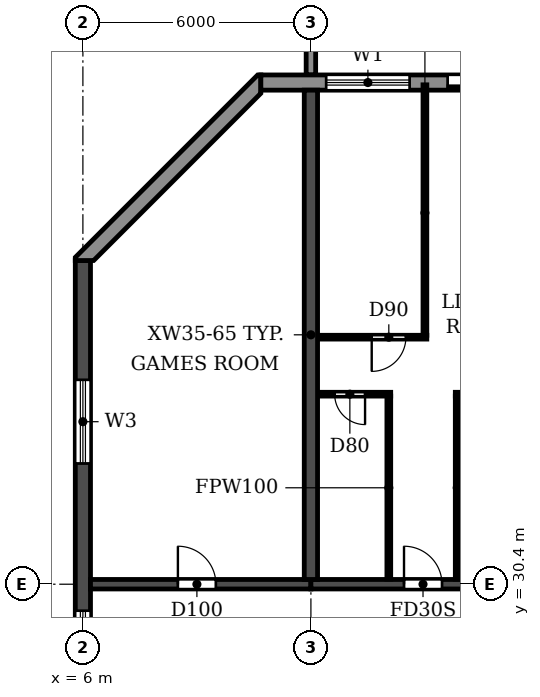
"""IFC4 building model, lengths in metres.
Left out: names, types, materials, properties, quantities, classifications, styles, units other than length and angle.
Written with IfcOpenShell. Run it as: python <this file> out.ifc"""

import sys

from ifc_helpers import new_model, si_unit, direction, frame, frame_2d, origin, place, context, subcontext, project, spatial, polyline, rectangle, outline, extrude, source, transform, mapped, element, fill, save


model = new_model("IFC4")
c1 = context("Model", 3, precision=1e-05, world=origin(), true_north=direction((0.0, 1.0)))
c2 = subcontext(c1, "Body", "Model", "MODEL_VIEW")
j1 = project(units=[si_unit("LENGTHUNIT", "METRE"), si_unit("PLANEANGLEUNIT", "RADIAN")], contexts=[c1])
p1 = place(None, origin())
s1 = spatial("IfcSite", under=j1, at=p1, CompositionType="ELEMENT")
p2 = place(p1, origin())
s2 = spatial("IfcBuilding", under=s1, at=p2, CompositionType="ELEMENT")
p3 = place(p2, frame((0.0, 0.0, 76.2)))
s3 = spatial("IfcBuildingStorey", under=s2, at=p3, CompositionType="ELEMENT", Elevation=76.2)
p4 = place(p3, frame((12.0, 30.525, 0.0), z_axis=(0.0, 0.0, 1.0), x_axis=(0.0, 1.0, 0.0)))
e1 = element("IfcWall", 1, at=p4, inside=s3, PredefinedType="SHEAR", context=c2, shape_type="SweptSolid", body=[
    extrude(rectangle(XDim=12.875, YDim=0.35, at=frame_2d((6.438, 0.0))), origin(), (0.0, 0.0, 1.0), 3.06),
])
p5 = place(p3, frame((6.0, 4.683, 0.0), z_axis=(0.0, 0.0, 1.0), x_axis=(0.0, 1.0, 0.0)))
e2 = element("IfcWall", 2, at=p5, inside=s3, PredefinedType="SHEAR", context=c2, shape_type="SweptSolid", body=[
    extrude(rectangle(XDim=34.234, YDim=0.4, at=frame_2d((17.117, 0.0))), origin(), (0.0, 0.0, 1.0), 3.06),
])
p6 = place(p5, frame((23.817, 0.0, 0.9)))
e3 = element("IfcOpeningElement", 3, at=p6, cuts=e2, PredefinedType="OPENING", context=c2, shape_type="SweptSolid", body=[
    extrude(rectangle(XDim=1.2, YDim=1.5, at=frame_2d((0.6, 0.75))), frame((0.0, 0.21, 0.0), z_axis=(0.0, -1.0, 0.0), x_axis=(1.0, 0.0, 0.0)), (0.0, 0.0, 1.0), 0.42),
])
p7 = place(p5, frame((8.017, 0.0, 0.9)))
e4 = element("IfcOpeningElement", 4, at=p7, cuts=e2, PredefinedType="OPENING", context=c2, shape_type="SweptSolid", body=[
    extrude(rectangle(XDim=1.2, YDim=1.5, at=frame_2d((0.6, 0.75))), frame((0.0, 0.21, 0.0), z_axis=(0.0, -1.0, 0.0), x_axis=(1.0, 0.0, 0.0)), (0.0, 0.0, 1.0), 0.42),
])
p8 = place(p5, frame((15.917, 0.0, 0.9)))
e5 = element("IfcOpeningElement", 5, at=p8, cuts=e2, PredefinedType="OPENING", context=c2, shape_type="SweptSolid", body=[
    extrude(rectangle(XDim=1.2, YDim=1.5, at=frame_2d((0.6, 0.75))), frame((0.0, 0.21, 0.0), z_axis=(0.0, -1.0, 0.0), x_axis=(1.0, 0.0, 0.0)), (0.0, 0.0, 1.0), 0.42),
])
p9 = place(p5, frame((28.894, 0.0, 0.6)))
e6 = element("IfcOpeningElement", 6, at=p9, cuts=e2, PredefinedType="OPENING", context=c2, shape_type="SweptSolid", body=[
    extrude(rectangle(XDim=2.2, YDim=1.8, at=frame_2d((1.1, 0.9))), frame((0.0, 0.21, 0.0), z_axis=(0.0, -1.0, 0.0), x_axis=(1.0, 0.0, 0.0)), (0.0, 0.0, 1.0), 0.42),
])
p10 = place(p5, frame((2.541, 0.0, 0.6)))
e7 = element("IfcOpeningElement", 7, at=p10, cuts=e2, PredefinedType="OPENING", context=c2, shape_type="SweptSolid", body=[
    extrude(rectangle(XDim=2.2, YDim=1.8, at=frame_2d((1.1, 0.9))), frame((0.0, 0.21, 0.0), z_axis=(0.0, -1.0, 0.0), x_axis=(1.0, 0.0, 0.0)), (0.0, 0.0, 1.0), 0.42),
])
p11 = place(p3, frame((6.2, 30.4, 0.0), z_axis=(0.0, 0.0, 1.0), x_axis=(1.0, 0.0, 0.0)))
e8 = element("IfcWall", 8, at=p11, inside=s3, PredefinedType="SHEAR", context=c2, shape_type="SweptSolid", body=[
    extrude(rectangle(XDim=5.8, YDim=0.25, at=frame_2d((2.9, 0.0))), origin(), (0.0, 0.0, 1.0), 2.46),
])
p12 = place(p11, frame((2.3, 0.0, 0.0)))
e9 = element("IfcOpeningElement", 9, at=p12, cuts=e8, PredefinedType="OPENING", context=c2, shape_type="SweptSolid", body=[
    extrude(rectangle(XDim=1.0, YDim=2.1, at=frame_2d((0.5, 1.05))), frame((0.0, 0.135, 0.0), z_axis=(0.0, -1.0, 0.0), x_axis=(1.0, 0.0, 0.0)), (0.0, 0.0, 1.0), 0.27),
])
p13 = place(p3, frame((12.0, 30.4, 0.0), z_axis=(0.0, 0.0, 1.0), x_axis=(1.0, 0.0, 0.0)))
e10 = element("IfcWall", 10, at=p13, inside=s3, PredefinedType="SHEAR", context=c2, shape_type="SweptSolid", body=[
    extrude(rectangle(XDim=6.0, YDim=0.25, at=frame_2d((3.0, 0.0))), origin(), (0.0, 0.0, 1.0), 2.46),
])
p14 = place(p13, frame((2.45, 0.0, 0.0)))
e11 = element("IfcOpeningElement", 11, at=p14, cuts=e10, PredefinedType="OPENING", context=c2, shape_type="SweptSolid", body=[
    extrude(rectangle(XDim=1.0, YDim=2.1, at=frame_2d((0.5, 1.05))), frame((0.0, 0.135, 0.0), z_axis=(0.0, -1.0, 0.0), x_axis=(1.0, 0.0, 0.0)), (0.0, 0.0, 1.0), 0.27),
])
p15 = place(p3, frame((91.317, 43.6, 0.0), z_axis=(0.0, 0.0, 1.0), x_axis=(-1.0, 0.0, 0.0)))
e12 = element("IfcWall", 12, at=p15, inside=s3, PredefinedType="STANDARD", context=c2, shape_type="SweptSolid", body=[
    extrude(rectangle(XDim=80.634, YDim=0.4, at=frame_2d((40.317, 0.0))), origin(), (0.0, 0.0, 1.0), 3.06),
])
p16 = place(p15, frame((76.717, 0.0, 0.9)))
e13 = element("IfcOpeningElement", 13, at=p16, cuts=e12, PredefinedType="OPENING", context=c2, shape_type="SweptSolid", body=[
    extrude(rectangle(XDim=2.2, YDim=1.5, at=frame_2d((1.1, 0.75))), frame((0.0, 0.21, 0.0), z_axis=(0.0, -1.0, 0.0), x_axis=(1.0, 0.0, 0.0)), (0.0, 0.0, 1.0), 0.42),
])
p17 = place(p15, frame((73.917, 0.0, 0.0)))
e14 = element("IfcOpeningElement", 14, at=p17, cuts=e12, PredefinedType="OPENING", context=c2, shape_type="SweptSolid", body=[
    extrude(rectangle(XDim=1.8, YDim=2.4, at=frame_2d((0.9, 1.2))), frame((0.0, 0.21, 0.0), z_axis=(0.0, -1.0, 0.0), x_axis=(1.0, 0.0, 0.0)), (0.0, 0.0, 1.0), 0.42),
])
p18 = place(p15, frame((70.917, 0.0, 0.0)))
e15 = element("IfcOpeningElement", 15, at=p18, cuts=e12, PredefinedType="OPENING", context=c2, shape_type="SweptSolid", body=[
    extrude(rectangle(XDim=1.8, YDim=2.4, at=frame_2d((0.9, 1.2))), frame((0.0, 0.21, 0.0), z_axis=(0.0, -1.0, 0.0), x_axis=(1.0, 0.0, 0.0)), (0.0, 0.0, 1.0), 0.42),
])
p19 = place(p15, frame((67.717, 0.0, 0.9)))
e16 = element("IfcOpeningElement", 16, at=p19, cuts=e12, PredefinedType="OPENING", context=c2, shape_type="SweptSolid", body=[
    extrude(rectangle(XDim=2.2, YDim=1.5, at=frame_2d((1.1, 0.75))), frame((0.0, 0.21, 0.0), z_axis=(0.0, -1.0, 0.0), x_axis=(1.0, 0.0, 0.0)), (0.0, 0.0, 1.0), 0.42),
])
p20 = place(p15, frame((64.717, 0.0, 0.9)))
e17 = element("IfcOpeningElement", 17, at=p20, cuts=e12, PredefinedType="OPENING", context=c2, shape_type="SweptSolid", body=[
    extrude(rectangle(XDim=2.2, YDim=1.5, at=frame_2d((1.1, 0.75))), frame((0.0, 0.21, 0.0), z_axis=(0.0, -1.0, 0.0), x_axis=(1.0, 0.0, 0.0)), (0.0, 0.0, 1.0), 0.42),
])
p21 = place(p15, frame((61.917, 0.0, 0.0)))
e18 = element("IfcOpeningElement", 18, at=p21, cuts=e12, PredefinedType="OPENING", context=c2, shape_type="SweptSolid", body=[
    extrude(rectangle(XDim=1.8, YDim=2.4, at=frame_2d((0.9, 1.2))), frame((0.0, 0.21, 0.0), z_axis=(0.0, -1.0, 0.0), x_axis=(1.0, 0.0, 0.0)), (0.0, 0.0, 1.0), 0.42),
])
p22 = place(p15, frame((58.717, 0.0, 0.9)))
e19 = element("IfcOpeningElement", 19, at=p22, cuts=e12, PredefinedType="OPENING", context=c2, shape_type="SweptSolid", body=[
    extrude(rectangle(XDim=2.2, YDim=1.5, at=frame_2d((1.1, 0.75))), frame((0.0, 0.21, 0.0), z_axis=(0.0, -1.0, 0.0), x_axis=(1.0, 0.0, 0.0)), (0.0, 0.0, 1.0), 0.42),
])
p23 = place(p15, frame((55.917, 0.0, 0.0)))
e20 = element("IfcOpeningElement", 20, at=p23, cuts=e12, PredefinedType="OPENING", context=c2, shape_type="SweptSolid", body=[
    extrude(rectangle(XDim=1.8, YDim=2.4, at=frame_2d((0.9, 1.2))), frame((0.0, 0.21, 0.0), z_axis=(0.0, -1.0, 0.0), x_axis=(1.0, 0.0, 0.0)), (0.0, 0.0, 1.0), 0.42),
])
p24 = place(p15, frame((52.717, 0.0, 0.9)))
e21 = element("IfcOpeningElement", 21, at=p24, cuts=e12, PredefinedType="OPENING", context=c2, shape_type="SweptSolid", body=[
    extrude(rectangle(XDim=2.2, YDim=1.5, at=frame_2d((1.1, 0.75))), frame((0.0, 0.21, 0.0), z_axis=(0.0, -1.0, 0.0), x_axis=(1.0, 0.0, 0.0)), (0.0, 0.0, 1.0), 0.42),
])
p25 = place(p15, frame((49.717, 0.0, 0.9)))
e22 = element("IfcOpeningElement", 22, at=p25, cuts=e12, PredefinedType="OPENING", context=c2, shape_type="SweptSolid", body=[
    extrude(rectangle(XDim=2.2, YDim=1.5, at=frame_2d((1.1, 0.75))), frame((0.0, 0.21, 0.0), z_axis=(0.0, -1.0, 0.0), x_axis=(1.0, 0.0, 0.0)), (0.0, 0.0, 1.0), 0.42),
])
p26 = place(p15, frame((46.917, 0.0, 0.0)))
e23 = element("IfcOpeningElement", 23, at=p26, cuts=e12, PredefinedType="OPENING", context=c2, shape_type="SweptSolid", body=[
    extrude(rectangle(XDim=1.8, YDim=2.4, at=frame_2d((0.9, 1.2))), frame((0.0, 0.21, 0.0), z_axis=(0.0, -1.0, 0.0), x_axis=(1.0, 0.0, 0.0)), (0.0, 0.0, 1.0), 0.42),
])
p27 = place(p15, frame((43.717, 0.0, 0.9)))
e24 = element("IfcOpeningElement", 24, at=p27, cuts=e12, PredefinedType="OPENING", context=c2, shape_type="SweptSolid", body=[
    extrude(rectangle(XDim=2.2, YDim=1.5, at=frame_2d((1.1, 0.75))), frame((0.0, 0.21, 0.0), z_axis=(0.0, -1.0, 0.0), x_axis=(1.0, 0.0, 0.0)), (0.0, 0.0, 1.0), 0.42),
])
p28 = place(p15, frame((40.717, 0.0, 0.9)))
e25 = element("IfcOpeningElement", 25, at=p28, cuts=e12, PredefinedType="OPENING", context=c2, shape_type="SweptSolid", body=[
    extrude(rectangle(XDim=2.2, YDim=1.5, at=frame_2d((1.1, 0.75))), frame((0.0, 0.21, 0.0), z_axis=(0.0, -1.0, 0.0), x_axis=(1.0, 0.0, 0.0)), (0.0, 0.0, 1.0), 0.42),
])
p29 = place(p15, frame((37.917, 0.0, 0.0)))
e26 = element("IfcOpeningElement", 26, at=p29, cuts=e12, PredefinedType="OPENING", context=c2, shape_type="SweptSolid", body=[
    extrude(rectangle(XDim=1.8, YDim=2.4, at=frame_2d((0.9, 1.2))), frame((0.0, 0.21, 0.0), z_axis=(0.0, -1.0, 0.0), x_axis=(1.0, 0.0, 0.0)), (0.0, 0.0, 1.0), 0.42),
])
p30 = place(p15, frame((34.717, 0.0, 0.9)))
e27 = element("IfcOpeningElement", 27, at=p30, cuts=e12, PredefinedType="OPENING", context=c2, shape_type="SweptSolid", body=[
    extrude(rectangle(XDim=2.2, YDim=1.5, at=frame_2d((1.1, 0.75))), frame((0.0, 0.21, 0.0), z_axis=(0.0, -1.0, 0.0), x_axis=(1.0, 0.0, 0.0)), (0.0, 0.0, 1.0), 0.42),
])
p31 = place(p15, frame((31.917, 0.0, 0.0)))
e28 = element("IfcOpeningElement", 28, at=p31, cuts=e12, PredefinedType="OPENING", context=c2, shape_type="SweptSolid", body=[
    extrude(rectangle(XDim=1.8, YDim=2.4, at=frame_2d((0.9, 1.2))), frame((0.0, 0.21, 0.0), z_axis=(0.0, -1.0, 0.0), x_axis=(1.0, 0.0, 0.0)), (0.0, 0.0, 1.0), 0.42),
])
p32 = place(p15, frame((28.717, 0.0, 0.9)))
e29 = element("IfcOpeningElement", 29, at=p32, cuts=e12, PredefinedType="OPENING", context=c2, shape_type="SweptSolid", body=[
    extrude(rectangle(XDim=2.2, YDim=1.5, at=frame_2d((1.1, 0.75))), frame((0.0, 0.21, 0.0), z_axis=(0.0, -1.0, 0.0), x_axis=(1.0, 0.0, 0.0)), (0.0, 0.0, 1.0), 0.42),
])
p33 = place(p15, frame((25.717, 0.0, 0.9)))
e30 = element("IfcOpeningElement", 30, at=p33, cuts=e12, PredefinedType="OPENING", context=c2, shape_type="SweptSolid", body=[
    extrude(rectangle(XDim=2.2, YDim=1.5, at=frame_2d((1.1, 0.75))), frame((0.0, 0.21, 0.0), z_axis=(0.0, -1.0, 0.0), x_axis=(1.0, 0.0, 0.0)), (0.0, 0.0, 1.0), 0.42),
])
p34 = place(p15, frame((22.717, 0.0, 0.9)))
e31 = element("IfcOpeningElement", 31, at=p34, cuts=e12, PredefinedType="OPENING", context=c2, shape_type="SweptSolid", body=[
    extrude(rectangle(XDim=2.2, YDim=1.5, at=frame_2d((1.1, 0.75))), frame((0.0, 0.21, 0.0), z_axis=(0.0, -1.0, 0.0), x_axis=(1.0, 0.0, 0.0)), (0.0, 0.0, 1.0), 0.42),
])
p35 = place(p15, frame((19.917, 0.0, 0.0)))
e32 = element("IfcOpeningElement", 32, at=p35, cuts=e12, PredefinedType="OPENING", context=c2, shape_type="SweptSolid", body=[
    extrude(rectangle(XDim=1.8, YDim=2.4, at=frame_2d((0.9, 1.2))), frame((0.0, 0.21, 0.0), z_axis=(0.0, -1.0, 0.0), x_axis=(1.0, 0.0, 0.0)), (0.0, 0.0, 1.0), 0.42),
])
p36 = place(p15, frame((16.717, 0.0, 0.9)))
e33 = element("IfcOpeningElement", 33, at=p36, cuts=e12, PredefinedType="OPENING", context=c2, shape_type="SweptSolid", body=[
    extrude(rectangle(XDim=2.2, YDim=1.5, at=frame_2d((1.1, 0.75))), frame((0.0, 0.21, 0.0), z_axis=(0.0, -1.0, 0.0), x_axis=(1.0, 0.0, 0.0)), (0.0, 0.0, 1.0), 0.42),
])
p37 = place(p15, frame((13.717, 0.0, 0.9)))
e34 = element("IfcOpeningElement", 34, at=p37, cuts=e12, PredefinedType="OPENING", context=c2, shape_type="SweptSolid", body=[
    extrude(rectangle(XDim=2.2, YDim=1.5, at=frame_2d((1.1, 0.75))), frame((0.0, 0.21, 0.0), z_axis=(0.0, -1.0, 0.0), x_axis=(1.0, 0.0, 0.0)), (0.0, 0.0, 1.0), 0.42),
])
p38 = place(p15, frame((10.717, 0.0, 0.9)))
e35 = element("IfcOpeningElement", 35, at=p38, cuts=e12, PredefinedType="OPENING", context=c2, shape_type="SweptSolid", body=[
    extrude(rectangle(XDim=2.2, YDim=1.5, at=frame_2d((1.1, 0.75))), frame((0.0, 0.21, 0.0), z_axis=(0.0, -1.0, 0.0), x_axis=(1.0, 0.0, 0.0)), (0.0, 0.0, 1.0), 0.42),
])
p39 = place(p15, frame((7.917, 0.0, 0.0)))
e36 = element("IfcOpeningElement", 36, at=p39, cuts=e12, PredefinedType="OPENING", context=c2, shape_type="SweptSolid", body=[
    extrude(rectangle(XDim=1.8, YDim=2.4, at=frame_2d((0.9, 1.2))), frame((0.0, 0.21, 0.0), z_axis=(0.0, -1.0, 0.0), x_axis=(1.0, 0.0, 0.0)), (0.0, 0.0, 1.0), 0.42),
])
p40 = place(p15, frame((4.717, 0.0, 0.9)))
e37 = element("IfcOpeningElement", 37, at=p40, cuts=e12, PredefinedType="OPENING", context=c2, shape_type="SweptSolid", body=[
    extrude(rectangle(XDim=2.2, YDim=1.5, at=frame_2d((1.1, 0.75))), frame((0.0, 0.21, 0.0), z_axis=(0.0, -1.0, 0.0), x_axis=(1.0, 0.0, 0.0)), (0.0, 0.0, 1.0), 0.42),
])
p41 = place(p15, frame((1.917, 0.0, 0.0)))
e38 = element("IfcOpeningElement", 38, at=p41, cuts=e12, PredefinedType="OPENING", context=c2, shape_type="SweptSolid", body=[
    extrude(rectangle(XDim=1.8, YDim=2.4, at=frame_2d((0.9, 1.2))), frame((0.0, 0.21, 0.0), z_axis=(0.0, -1.0, 0.0), x_axis=(1.0, 0.0, 0.0)), (0.0, 0.0, 1.0), 0.42),
])
p42 = place(p3, origin())
e39 = element("IfcWall", 39, at=p42, inside=s3, PredefinedType="STANDARD", context=c2, shape_type="SweptSolid", body=[
    extrude(outline(polyline([(10.683, 43.8), (10.6, 43.8), (5.8, 39.0), (5.8, 38.917), (6.283, 38.917), (10.683, 43.317), (10.683, 43.8)])), origin(), (0.0, 0.0, 1.0), 3.06),
])
m1 = source(origin(), c2, "Body", "SweptSolid", [
    extrude(outline(polyline([(0.0, 0.0), (0.25, 0.0), (0.25, 3.1), (0.0, 3.1), (0.0, 0.0)])), origin(), (0.0, 0.0, 1.0), 3.1),
])
p43 = place(p3, frame((11.875, 43.8, 0.0)))
e40 = element("IfcWall", 40, at=p43, inside=s3, PredefinedType="STANDARD", context=c2, shape_type="MappedRepresentation", body=[
    mapped(m1, transform((0.0, 0.0, 0.0))),
])
p44 = place(p3, frame((12.185, 35.4, 0.0), z_axis=(0.0, 0.0, 1.0), x_axis=(1.0, 0.0, 0.0)))
e41 = element("IfcWall", 41, at=p44, inside=s3, PredefinedType="PARTITIONING", context=c2, shape_type="SweptSolid", body=[
    extrude(rectangle(XDim=1.915, YDim=0.1, at=frame_2d((0.958, 0.0))), origin(), (0.0, 0.0, 1.0), 3.06),
])
p45 = place(p44, frame((0.44, 0.0, 0.0)))
e42 = element("IfcOpeningElement", 42, at=p45, cuts=e41, PredefinedType="OPENING", context=c2, shape_type="SweptSolid", body=[
    extrude(rectangle(XDim=0.8, YDim=2.1, at=frame_2d((0.4, 1.05))), frame((0.0, 0.06, 0.0), z_axis=(0.0, -1.0, 0.0), x_axis=(1.0, 0.0, 0.0)), (0.0, 0.0, 1.0), 0.12),
])
p46 = place(p3, frame((15.8, 35.4, 0.0), z_axis=(0.0, 0.0, 1.0), x_axis=(1.0, 0.0, 0.0)))
e43 = element("IfcWall", 43, at=p46, inside=s3, PredefinedType="PARTITIONING", context=c2, shape_type="SweptSolid", body=[
    extrude(rectangle(XDim=2.015, YDim=0.1, at=frame_2d((1.007, 0.0))), origin(), (0.0, 0.0, 1.0), 3.06),
])
p47 = place(p46, frame((0.675, 0.0, 0.0)))
e44 = element("IfcOpeningElement", 44, at=p47, cuts=e43, PredefinedType="OPENING", context=c2, shape_type="SweptSolid", body=[
    extrude(rectangle(XDim=0.9, YDim=2.1, at=frame_2d((0.45, 1.05))), frame((0.0, 0.06, 0.0), z_axis=(0.0, -1.0, 0.0), x_axis=(1.0, 0.0, 0.0)), (0.0, 0.0, 1.0), 0.12),
])
p48 = place(p3, frame((12.185, 36.9, 0.0), z_axis=(0.0, 0.0, 1.0), x_axis=(1.0, 0.0, 0.0)))
e45 = element("IfcWall", 45, at=p48, inside=s3, PredefinedType="PARTITIONING", context=c2, shape_type="SweptSolid", body=[
    extrude(rectangle(XDim=2.865, YDim=0.1, at=frame_2d((1.433, 0.0))), origin(), (0.0, 0.0, 1.0), 3.06),
])
p49 = place(p48, frame((1.415, 0.0, 0.0)))
e46 = element("IfcOpeningElement", 46, at=p49, cuts=e45, PredefinedType="OPENING", context=c2, shape_type="SweptSolid", body=[
    extrude(rectangle(XDim=0.9, YDim=2.1, at=frame_2d((0.45, 1.05))), frame((0.0, 0.06, 0.0), z_axis=(0.0, -1.0, 0.0), x_axis=(1.0, 0.0, 0.0)), (0.0, 0.0, 1.0), 0.12),
])
p50 = place(p3, frame((14.05, 30.535, 0.0), z_axis=(0.0, 0.0, 1.0), x_axis=(0.0, 1.0, 0.0)))
e47 = element("IfcWall", 47, at=p50, inside=s3, PredefinedType="PARTITIONING", context=c2, shape_type="SweptSolid", body=[
    extrude(rectangle(XDim=4.815, YDim=0.1, at=frame_2d((2.408, 0.0))), origin(), (0.0, 0.0, 1.0), 3.06),
])
p51 = place(p3, frame((15.0, 36.95, 0.0), z_axis=(0.0, 0.0, 1.0), x_axis=(0.0, 1.0, 0.0)))
e48 = element("IfcWall", 48, at=p51, inside=s3, PredefinedType="PARTITIONING", context=c2, shape_type="SweptSolid", body=[
    extrude(rectangle(XDim=6.59, YDim=0.1, at=frame_2d((3.295, 0.0))), origin(), (0.0, 0.0, 1.0), 3.06),
])
p52 = place(p3, frame((15.85, 30.535, 0.0), z_axis=(0.0, 0.0, 1.0), x_axis=(0.0, 1.0, 0.0)))
e49 = element("IfcWall", 49, at=p52, inside=s3, PredefinedType="PARTITIONING", context=c2, shape_type="SweptSolid", body=[
    extrude(rectangle(XDim=4.815, YDim=0.1, at=frame_2d((2.408, 0.0))), origin(), (0.0, 0.0, 1.0), 3.06),
])
p53 = place(p16, origin())
e50 = element("IfcWindow", 50, at=p53, inside=s3, PartitioningType="DOUBLE_PANEL_HORIZONTAL", PredefinedType="WINDOW", context=c2, shape_type="SweptSolid", body=[
    extrude(rectangle(XDim=2.2, YDim=1.5, at=frame_2d((1.1, 0.75))), frame((0.0, 0.03, 0.0), z_axis=(0.0, -1.0, 0.0), x_axis=(1.0, 0.0, 0.0)), (0.0, 0.0, 1.0), 0.06),
])
fill(e13, e50)
p54 = place(p17, origin())
e51 = element("IfcDoor", 51, at=p54, inside=s3, OperationType="DOUBLE_DOOR_SLIDING", PredefinedType="DOOR", context=c2, shape_type="SweptSolid", body=[
    extrude(rectangle(XDim=1.8, YDim=2.4, at=frame_2d((0.9, 1.2))), frame((0.0, 0.025, 0.0), z_axis=(0.0, -1.0, 0.0), x_axis=(1.0, 0.0, 0.0)), (0.0, 0.0, 1.0), 0.05),
])
fill(e14, e51)
p55 = place(p6, origin())
e52 = element("IfcWindow", 52, at=p55, inside=s3, PartitioningType="SINGLE_PANEL", PredefinedType="WINDOW", context=c2, shape_type="SweptSolid", body=[
    extrude(rectangle(XDim=1.2, YDim=1.5, at=frame_2d((0.6, 0.75))), frame((0.0, 0.03, 0.0), z_axis=(0.0, -1.0, 0.0), x_axis=(1.0, 0.0, 0.0)), (0.0, 0.0, 1.0), 0.06),
])
fill(e3, e52)
p56 = place(p9, origin())
e53 = element("IfcWindow", 53, at=p56, inside=s3, PartitioningType="DOUBLE_PANEL_HORIZONTAL", PredefinedType="WINDOW", context=c2, shape_type="SweptSolid", body=[
    extrude(rectangle(XDim=2.2, YDim=1.8, at=frame_2d((1.1, 0.9))), frame((0.0, 0.03, 0.0), z_axis=(0.0, -1.0, 0.0), x_axis=(1.0, 0.0, 0.0)), (0.0, 0.0, 1.0), 0.06),
])
fill(e6, e53)
p57 = place(p12, origin())
e54 = element("IfcDoor", 54, at=p57, inside=s3, OperationType="SINGLE_SWING_LEFT", PredefinedType="DOOR", context=c2, shape_type="SweptSolid", body=[
    extrude(rectangle(XDim=1.0, YDim=2.1, at=frame_2d((0.5, 1.05))), frame((0.0, 0.025, 0.0), z_axis=(0.0, -1.0, 0.0), x_axis=(1.0, 0.0, 0.0)), (0.0, 0.0, 1.0), 0.05),
])
fill(e9, e54)
p58 = place(p45, frame((0.8, 0.0, 0.0), z_axis=(0.0, 0.0, 1.0), x_axis=(-1.0, 0.0, 0.0)))
e55 = element("IfcDoor", 55, at=p58, inside=s3, OperationType="SINGLE_SWING_LEFT", PredefinedType="DOOR", context=c2, shape_type="SweptSolid", body=[
    extrude(rectangle(XDim=0.8, YDim=2.1, at=frame_2d((0.4, 1.05))), frame((0.0, 0.025, 0.0), z_axis=(0.0, -1.0, 0.0), x_axis=(1.0, 0.0, 0.0)), (0.0, 0.0, 1.0), 0.05),
])
fill(e42, e55)
p59 = place(p49, frame((0.9, 0.0, 0.0), z_axis=(0.0, 0.0, 1.0), x_axis=(-1.0, 0.0, 0.0)))
e56 = element("IfcDoor", 56, at=p59, inside=s3, OperationType="SINGLE_SWING_RIGHT", PredefinedType="DOOR", context=c2, shape_type="SweptSolid", body=[
    extrude(rectangle(XDim=0.9, YDim=2.1, at=frame_2d((0.45, 1.05))), frame((0.0, 0.025, 0.0), z_axis=(0.0, -1.0, 0.0), x_axis=(1.0, 0.0, 0.0)), (0.0, 0.0, 1.0), 0.05),
])
fill(e46, e56)
p60 = place(p14, origin())
e57 = element("IfcDoor", 57, at=p60, inside=s3, OperationType="SINGLE_SWING_LEFT", PredefinedType="DOOR", context=c2, shape_type="SweptSolid", body=[
    extrude(rectangle(XDim=1.0, YDim=2.1, at=frame_2d((0.5, 1.05))), frame((0.0, 0.025, 0.0), z_axis=(0.0, -1.0, 0.0), x_axis=(1.0, 0.0, 0.0)), (0.0, 0.0, 1.0), 0.05),
])
fill(e11, e57)
save(model, sys.argv[1])
